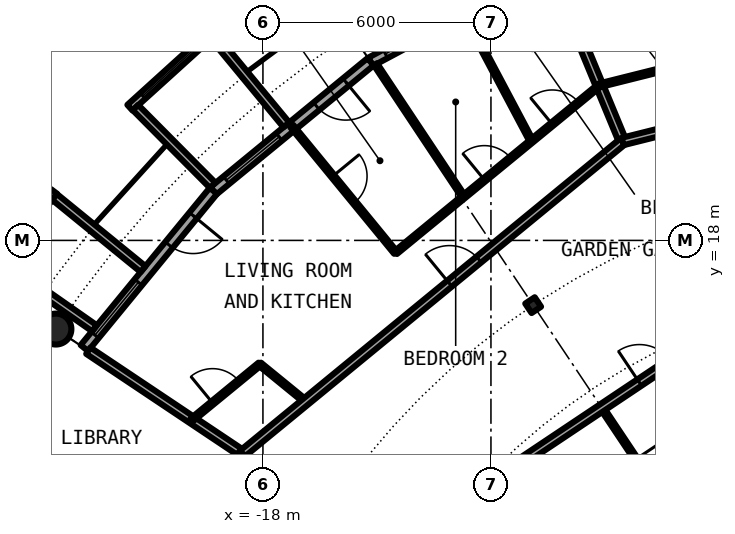
"""IFC4 building model, lengths in metres.
Left out: names, types, materials, properties, quantities, classifications, styles, units other than length and angle.
Written with IfcOpenShell. Run it as: python <this file> out.ifc"""

import sys

from ifc_helpers import new_model, si_unit, direction, frame, frame_2d, origin, origin_2d, place, context, subcontext, project, spatial, rectangle, circle, hollow_circle, i_section, extrude, element, fill, save


model = new_model("IFC4")
c1 = context("Model", 3, precision=1e-05, world=origin(), true_north=direction((0.0, 1.0)))
c2 = subcontext(c1, "Body", "Model", "MODEL_VIEW")
j1 = project(units=[si_unit("LENGTHUNIT", "METRE"), si_unit("PLANEANGLEUNIT", "RADIAN")], contexts=[c1])
p1 = place(None, origin())
s1 = spatial("IfcSite", under=j1, at=p1, CompositionType="ELEMENT")
p2 = place(p1, origin())
s2 = spatial("IfcBuilding", under=s1, at=p2, CompositionType="ELEMENT")
p3 = place(p2, frame((0.0, 0.0, 227.95)))
s3 = spatial("IfcBuildingStorey", under=s2, at=p3, CompositionType="ELEMENT", Elevation=227.95)
p4 = place(p3, frame((-23.448, 15.667, 0.0), z_axis=(0.0, 0.0, 1.0), x_axis=(1.0, 0.0, 0.0)))
e1 = element("IfcColumn", 1, at=p4, inside=s3, PredefinedType="COLUMN", context=c2, shape_type="SweptSolid", body=[
    extrude(hollow_circle(Radius=0.406, WallThickness=0.03, at=origin_2d()), origin(), (0.0, 0.0, 1.0), 3.05),
])
p5 = place(p3, frame((-10.889, 16.297, 0.0), z_axis=(0.0, 0.0, 1.0), x_axis=(-0.55557023302, 0.831469612303, 0.0)))
e2 = element("IfcColumn", 2, at=p5, inside=s3, PredefinedType="COLUMN", context=c2, shape_type="SweptSolid", body=[
    extrude(i_section(OverallWidth=0.3, OverallDepth=0.3, WebThickness=0.011, FlangeThickness=0.019, FilletRadius=0.027, at=origin_2d()), origin(), (0.0, 0.0, 1.0), 3.05),
])
p6 = place(p3, frame((-10.447, 25.222, 0.0), z_axis=(0.0, 0.0, 1.0), x_axis=(-0.881915646801, -0.471407246368, 0.0)))
e3 = element("IfcWall", 3, at=p6, inside=s3, PredefinedType="SOLIDWALL", context=c2, shape_type="SweptSolid", body=[
    extrude(rectangle(XDim=5.352, YDim=0.25, at=frame_2d((2.676, 0.0))), origin(), (0.0, 0.0, 1.0), 2.7),
])
p7 = place(p6, frame((0.841, 0.0, 0.0)))
e4 = element("IfcOpeningElement", 4, at=p7, cuts=e3, PredefinedType="OPENING", context=c2, shape_type="SweptSolid", body=[
    extrude(rectangle(XDim=1.0, YDim=2.2, at=frame_2d((0.5, 1.1))), frame((0.0, 0.135, 0.0), z_axis=(0.0, -1.0, 0.0), x_axis=(1.0, 0.0, 0.0)), (0.0, 0.0, 1.0), 0.27),
])
p8 = place(p6, frame((3.111, 0.0, 0.3)))
e5 = element("IfcOpeningElement", 5, at=p8, cuts=e3, PredefinedType="OPENING", context=c2, shape_type="SweptSolid", body=[
    extrude(rectangle(XDim=1.8, YDim=2.1, at=frame_2d((0.9, 1.05))), frame((0.0, 0.135, 0.0), z_axis=(0.0, -1.0, 0.0), x_axis=(1.0, 0.0, 0.0)), (0.0, 0.0, 1.0), 0.27),
])
p9 = place(p3, frame((-15.167, 22.699, 0.0), z_axis=(0.0, 0.0, 1.0), x_axis=(-0.773019449054, -0.634382322723, 0.0)))
e6 = element("IfcWall", 6, at=p9, inside=s3, PredefinedType="SOLIDWALL", context=c2, shape_type="SweptSolid", body=[
    extrude(rectangle(XDim=5.352, YDim=0.25, at=frame_2d((2.676, 0.0))), origin(), (0.0, 0.0, 1.0), 2.7),
])
p10 = place(p9, frame((0.841, 0.0, 0.0)))
e7 = element("IfcOpeningElement", 7, at=p10, cuts=e6, PredefinedType="OPENING", context=c2, shape_type="SweptSolid", body=[
    extrude(rectangle(XDim=1.0, YDim=2.2, at=frame_2d((0.5, 1.1))), frame((0.0, 0.135, 0.0), z_axis=(0.0, -1.0, 0.0), x_axis=(1.0, 0.0, 0.0)), (0.0, 0.0, 1.0), 0.27),
])
p11 = place(p9, frame((3.111, 0.0, 0.3)))
e8 = element("IfcOpeningElement", 8, at=p11, cuts=e6, PredefinedType="OPENING", context=c2, shape_type="SweptSolid", body=[
    extrude(rectangle(XDim=1.8, YDim=2.1, at=frame_2d((0.9, 1.05))), frame((0.0, 0.135, 0.0), z_axis=(0.0, -1.0, 0.0), x_axis=(1.0, 0.0, 0.0)), (0.0, 0.0, 1.0), 0.27),
])
p12 = place(p3, frame((-19.282, 23.503, -0.03), z_axis=(0.0, 0.0, 1.0), x_axis=(-0.740998365753, -0.671506829416, 0.0)))
e9 = element("IfcWall", 9, at=p12, inside=s3, PredefinedType="SOLIDWALL", context=c2, shape_type="SweptSolid", body=[
    extrude(rectangle(XDim=2.993, YDim=0.2, at=frame_2d((1.497, 0.0))), origin(), (0.0, 0.0, 1.0), 2.73),
])
p13 = place(p12, frame((0.457, 0.0, 0.33)))
e10 = element("IfcOpeningElement", 10, at=p13, cuts=e9, PredefinedType="OPENING", context=c2, shape_type="SweptSolid", body=[
    extrude(circle(Radius=1.04, at=frame_2d((1.04, 1.04))), frame((0.0, 0.11, 0.0), z_axis=(0.0, -1.0, 0.0), x_axis=(1.0, 0.0, 0.0)), (0.0, 0.0, 1.0), 0.22),
])
p14 = place(p3, frame((-17.384, 21.041, -0.03), z_axis=(0.0, 0.0, 1.0), x_axis=(-0.63709551667, 0.770784861449, 0.0)))
e11 = element("IfcWall", 11, at=p14, inside=s3, PredefinedType="SOLIDWALL", context=c2, shape_type="SweptSolid", body=[
    extrude(rectangle(XDim=3.006, YDim=0.2, at=frame_2d((1.503, 0.0))), origin(), (0.0, 0.0, 1.0), 2.73),
])
p15 = place(p3, frame((-19.323, 19.45, -0.03), z_axis=(0.0, 0.0, 1.0), x_axis=(-0.704476739375, 0.709727076896, 0.0)))
e12 = element("IfcWall", 12, at=p15, inside=s3, PredefinedType="SOLIDWALL", context=c2, shape_type="SweptSolid", body=[
    extrude(rectangle(XDim=2.883, YDim=0.2, at=frame_2d((1.441, 0.0))), origin(), (0.0, 0.0, 1.0), 2.73),
])
p16 = place(p3, frame((-19.304, 19.304, 0.0), z_axis=(0.0, 0.0, 1.0), x_axis=(-0.634382322723, -0.773019449054, 0.0)))
e13 = element("IfcWall", 13, at=p16, inside=s3, PredefinedType="SOLIDWALL", context=c2, shape_type="SweptSolid", body=[
    extrude(rectangle(XDim=5.352, YDim=0.25, at=frame_2d((2.676, 0.0))), origin(), (0.0, 0.0, 1.0), 2.7),
])
p17 = place(p16, frame((0.841, 0.0, 0.0)))
e14 = element("IfcOpeningElement", 14, at=p17, cuts=e13, PredefinedType="OPENING", context=c2, shape_type="SweptSolid", body=[
    extrude(rectangle(XDim=1.0, YDim=2.2, at=frame_2d((0.5, 1.1))), frame((0.0, 0.135, 0.0), z_axis=(0.0, -1.0, 0.0), x_axis=(1.0, 0.0, 0.0)), (0.0, 0.0, 1.0), 0.27),
])
p18 = place(p16, frame((3.111, 0.0, 0.3)))
e15 = element("IfcOpeningElement", 15, at=p18, cuts=e13, PredefinedType="OPENING", context=c2, shape_type="SweptSolid", body=[
    extrude(rectangle(XDim=1.8, YDim=2.1, at=frame_2d((0.9, 1.05))), frame((0.0, 0.135, 0.0), z_axis=(0.0, -1.0, 0.0), x_axis=(1.0, 0.0, 0.0)), (0.0, 0.0, 1.0), 0.27),
])
p19 = place(p3, frame((-23.497, 19.289, -0.03), z_axis=(0.0, 0.0, 1.0), x_axis=(-0.602806268067, -0.797887588059, 0.0)))
e16 = element("IfcWall", 16, at=p19, inside=s3, PredefinedType="SOLIDWALL", context=c2, shape_type="SweptSolid", body=[
    extrude(rectangle(XDim=2.447, YDim=0.2, at=frame_2d((1.223, 0.0))), origin(), (0.0, 0.0, 1.0), 2.73),
])
p20 = place(p19, frame((0.183, 0.0, 0.33)))
e17 = element("IfcOpeningElement", 17, at=p20, cuts=e16, PredefinedType="OPENING", context=c2, shape_type="SweptSolid", body=[
    extrude(circle(Radius=1.04, at=frame_2d((1.04, 1.04))), frame((0.0, 0.11, 0.0), z_axis=(0.0, -1.0, 0.0), x_axis=(1.0, 0.0, 0.0)), (0.0, 0.0, 1.0), 0.22),
])
p21 = place(p3, frame((-21.155, 17.246, -0.03), z_axis=(0.0, 0.0, 1.0), x_axis=(-0.775179004516, 0.631741648902, 0.0)))
e18 = element("IfcWall", 18, at=p21, inside=s3, PredefinedType="SOLIDWALL", context=c2, shape_type="SweptSolid", body=[
    extrude(rectangle(XDim=3.006, YDim=0.2, at=frame_2d((1.503, 0.0))), origin(), (0.0, 0.0, 1.0), 2.73),
])
p22 = place(p3, frame((-22.433, 15.688, -0.03), z_axis=(0.0, 0.0, 1.0), x_axis=(-0.819373043115, 0.573260687834, 0.0)))
e19 = element("IfcWall", 19, at=p22, inside=s3, PredefinedType="SOLIDWALL", context=c2, shape_type="SweptSolid", body=[
    extrude(rectangle(XDim=2.925, YDim=0.2, at=frame_2d((1.463, 0.0))), origin(), (0.0, 0.0, 1.0), 2.73),
])
p23 = place(p3, frame((-22.595, 15.098, 0.0), z_axis=(0.0, 0.0, 1.0), x_axis=(0.831387096605, -0.55569370664, 0.0)))
e20 = element("IfcWall", 20, at=p23, inside=s3, PredefinedType="PARTITIONING", context=c2, shape_type="SweptSolid", body=[
    extrude(rectangle(XDim=4.875, YDim=0.2, at=frame_2d((2.438, 0.0))), origin(), (0.0, 0.0, 1.0), 2.7),
])
p24 = place(p3, frame((-18.084, 14.745, 0.0), z_axis=(0.0, 0.0, 1.0), x_axis=(0.774869051393, -0.632121786679, 0.0)))
e21 = element("IfcWall", 21, at=p24, inside=s3, PredefinedType="PARTITIONING", context=c2, shape_type="SweptSolid", body=[
    extrude(rectangle(XDim=1.562, YDim=0.1, at=frame_2d((0.781, 0.0))), origin(), (0.0, 0.0, 1.0), 2.7),
])
p25 = place(p3, frame((-17.24, 21.007, 0.0), z_axis=(0.0, 0.0, 1.0), x_axis=(0.634342681687, -0.77305197897, 0.0)))
e22 = element("IfcWall", 22, at=p25, inside=s3, PredefinedType="PARTITIONING", context=c2, shape_type="SweptSolid", body=[
    extrude(rectangle(XDim=4.305, YDim=0.1, at=frame_2d((2.153, 0.0))), origin(), (0.0, 0.0, 1.0), 2.7),
])
p26 = place(p25, frame((1.703, 0.0, 0.0)))
e23 = element("IfcOpeningElement", 23, at=p26, cuts=e22, PredefinedType="OPENING", context=c2, shape_type="SweptSolid", body=[
    extrude(rectangle(XDim=0.9, YDim=2.3, at=frame_2d((0.45, 1.15))), frame((0.0, 0.06, 0.0), z_axis=(0.0, -1.0, 0.0), x_axis=(1.0, 0.0, 0.0)), (0.0, 0.0, 1.0), 0.12),
])
p27 = place(p3, frame((-12.734, 24.007, 0.0), z_axis=(0.0, 0.0, 1.0), x_axis=(0.468594334564, -0.883413464701, 0.0)))
e24 = element("IfcWall", 24, at=p27, inside=s3, PredefinedType="PARTITIONING", context=c2, shape_type="SweptSolid", body=[
    extrude(rectangle(XDim=3.841, YDim=0.1, at=frame_2d((1.92, 0.0))), origin(), (0.0, 0.0, 1.0), 2.7),
])
p28 = place(p3, frame((-10.399, 25.106, 0.0), z_axis=(0.0, 0.0, 1.0), x_axis=(0.382651153718, -0.923892902104, 0.0)))
e25 = element("IfcWall", 25, at=p28, inside=s3, PredefinedType="PARTITIONING", context=c2, shape_type="SweptSolid", body=[
    extrude(rectangle(XDim=4.874, YDim=0.2, at=frame_2d((2.437, 0.0))), origin(), (0.0, 0.0, 1.0), 2.7),
])
p29 = place(p3, frame((-9.085, 13.597, 0.0), z_axis=(0.0, 0.0, 1.0), x_axis=(0.555528237031, -0.831497671591, 0.0)))
e26 = element("IfcWall", 26, at=p29, inside=s3, PredefinedType="PARTITIONING", context=c2, shape_type="SweptSolid", body=[
    extrude(rectangle(XDim=4.149, YDim=0.1, at=frame_2d((2.075, 0.0))), origin(), (0.0, 0.0, 1.0), 2.7),
])
p30 = place(p29, frame((1.625, 0.0, 0.0)))
e27 = element("IfcOpeningElement", 27, at=p30, cuts=e26, PredefinedType="OPENING", context=c2, shape_type="SweptSolid", body=[
    extrude(rectangle(XDim=0.9, YDim=2.3, at=frame_2d((0.45, 1.15))), frame((0.0, 0.06, 0.0), z_axis=(0.0, -1.0, 0.0), x_axis=(1.0, 0.0, 0.0)), (0.0, 0.0, 1.0), 0.12),
])
p31 = place(p3, frame((-7.897, 26.002, 0.0), z_axis=(0.0, 0.0, 1.0), x_axis=(0.290784578865, -0.956788549625, 0.0)))
e28 = element("IfcWall", 28, at=p31, inside=s3, PredefinedType="PARTITIONING", context=c2, shape_type="SweptSolid", body=[
    extrude(rectangle(XDim=3.504, YDim=0.1, at=frame_2d((1.752, 0.0))), origin(), (0.0, 0.0, 1.0), 2.7),
])
p32 = place(p31, frame((1.302, 0.0, 0.0)))
e29 = element("IfcOpeningElement", 29, at=p32, cuts=e28, PredefinedType="OPENING", context=c2, shape_type="SweptSolid", body=[
    extrude(rectangle(XDim=0.9, YDim=2.3, at=frame_2d((0.45, 1.15))), frame((0.0, 0.06, 0.0), z_axis=(0.0, -1.0, 0.0), x_axis=(1.0, 0.0, 0.0)), (0.0, 0.0, 1.0), 0.12),
])
p33 = place(p3, frame((-15.039, 22.634, 0.0), z_axis=(0.0, 0.0, 1.0), x_axis=(0.553609857728, -0.832776155654, 0.0)))
e30 = element("IfcWall", 30, at=p33, inside=s3, PredefinedType="PARTITIONING", context=c2, shape_type="SweptSolid", body=[
    extrude(rectangle(XDim=4.187, YDim=0.1, at=frame_2d((2.094, 0.0))), origin(), (0.0, 0.0, 1.0), 2.7),
])
p34 = place(p3, frame((-14.718, 9.832, 0.0), z_axis=(0.0, 0.0, 1.0), x_axis=(0.831437137577, 0.555618831806, 0.0)))
e31 = element("IfcWall", 31, at=p34, inside=s3, PredefinedType="PARTITIONING", context=c2, shape_type="SweptSolid", body=[
    extrude(rectangle(XDim=13.549, YDim=0.2, at=frame_2d((6.774, 0.0))), origin(), (0.0, 0.0, 1.0), 2.7),
])
p35 = place(p34, frame((7.968, 0.0, 0.0)))
e32 = element("IfcOpeningElement", 32, at=p35, cuts=e31, PredefinedType="OPENING", context=c2, shape_type="SweptSolid", body=[
    extrude(rectangle(XDim=1.0, YDim=2.3, at=frame_2d((0.5, 1.15))), frame((0.0, 0.11, 0.0), z_axis=(0.0, -1.0, 0.0), x_axis=(1.0, 0.0, 0.0)), (0.0, 0.0, 1.0), 0.22),
])
p36 = place(p3, frame((-18.542, 12.389, 0.0), z_axis=(0.0, 0.0, 1.0), x_axis=(0.772983503654, 0.634426121056, 0.0)))
e33 = element("IfcWall", 33, at=p36, inside=s3, PredefinedType="PARTITIONING", context=c2, shape_type="SweptSolid", body=[
    extrude(rectangle(XDim=12.947, YDim=0.2, at=frame_2d((6.474, 0.0))), origin(), (0.0, 0.0, 1.0), 2.7),
])
p37 = place(p36, frame((7.053, 0.0, 0.0)))
e34 = element("IfcOpeningElement", 34, at=p37, cuts=e33, PredefinedType="OPENING", context=c2, shape_type="SweptSolid", body=[
    extrude(rectangle(XDim=1.0, YDim=2.3, at=frame_2d((0.5, 1.15))), frame((0.0, 0.11, 0.0), z_axis=(0.0, -1.0, 0.0), x_axis=(1.0, 0.0, 0.0)), (0.0, 0.0, 1.0), 0.22),
])
p38 = place(p3, frame((-8.534, 20.603, 0.0), z_axis=(0.0, 0.0, 1.0), x_axis=(0.97003047456, 0.242983288366, 0.0)))
e35 = element("IfcWall", 35, at=p38, inside=s3, PredefinedType="PARTITIONING", context=c2, shape_type="SweptSolid", body=[
    extrude(rectangle(XDim=6.544, YDim=0.2, at=frame_2d((3.272, 0.0))), origin(), (0.0, 0.0, 1.0), 2.7),
])
p39 = place(p38, frame((1.681, 0.0, 0.0)))
e36 = element("IfcOpeningElement", 36, at=p39, cuts=e35, PredefinedType="OPENING", context=c2, shape_type="SweptSolid", body=[
    extrude(rectangle(XDim=1.0, YDim=2.3, at=frame_2d((0.5, 1.15))), frame((0.0, 0.11, 0.0), z_axis=(0.0, -1.0, 0.0), x_axis=(1.0, 0.0, 0.0)), (0.0, 0.0, 1.0), 0.22),
])
p40 = place(p3, frame((-19.328, 10.896, 0.0), z_axis=(0.0, 0.0, 1.0), x_axis=(0.465812036273, 0.88488369115, 0.0)))
e37 = element("IfcWall", 37, at=p40, inside=s3, PredefinedType="PARTITIONING", context=c2, shape_type="SweptSolid", body=[
    extrude(rectangle(XDim=1.687, YDim=0.2, at=frame_2d((0.844, 0.0))), origin(), (0.0, 0.0, 1.0), 2.7),
])
p41 = place(p3, frame((-19.872, 13.278, 0.0), z_axis=(0.0, 0.0, 1.0), x_axis=(0.773095932958, 0.634289112663, 0.0)))
e38 = element("IfcWall", 38, at=p41, inside=s3, PredefinedType="PARTITIONING", context=c2, shape_type="SweptSolid", body=[
    extrude(rectangle(XDim=2.313, YDim=0.1, at=frame_2d((1.156, 0.0))), origin(), (0.0, 0.0, 1.0), 2.7),
])
p42 = place(p41, frame((0.706, 0.0, 0.0)))
e39 = element("IfcOpeningElement", 39, at=p42, cuts=e38, PredefinedType="OPENING", context=c2, shape_type="SweptSolid", body=[
    extrude(rectangle(XDim=0.9, YDim=2.3, at=frame_2d((0.45, 1.15))), frame((0.0, 0.06, 0.0), z_axis=(0.0, -1.0, 0.0), x_axis=(1.0, 0.0, 0.0)), (0.0, 0.0, 1.0), 0.12),
])
p43 = place(p3, frame((-14.505, 17.681, 0.0), z_axis=(0.0, 0.0, 1.0), x_axis=(0.773067618794, 0.634323621484, 0.0)))
e40 = element("IfcWall", 40, at=p43, inside=s3, PredefinedType="PARTITIONING", context=c2, shape_type="SweptSolid", body=[
    extrude(rectangle(XDim=6.938, YDim=0.1, at=frame_2d((3.469, 0.0))), origin(), (0.0, 0.0, 1.0), 2.7),
])
p44 = place(p43, frame((3.016, 0.0, 0.0)))
e41 = element("IfcOpeningElement", 41, at=p44, cuts=e40, PredefinedType="OPENING", context=c2, shape_type="SweptSolid", body=[
    extrude(rectangle(XDim=0.9, YDim=2.3, at=frame_2d((0.45, 1.15))), frame((0.0, 0.06, 0.0), z_axis=(0.0, -1.0, 0.0), x_axis=(1.0, 0.0, 0.0)), (0.0, 0.0, 1.0), 0.12),
])
p45 = place(p43, frame((5.325, 0.0, 0.0)))
e42 = element("IfcOpeningElement", 42, at=p45, cuts=e40, PredefinedType="OPENING", context=c2, shape_type="SweptSolid", body=[
    extrude(rectangle(XDim=0.9, YDim=2.3, at=frame_2d((0.45, 1.15))), frame((0.0, 0.06, 0.0), z_axis=(0.0, -1.0, 0.0), x_axis=(1.0, 0.0, 0.0)), (0.0, 0.0, 1.0), 0.12),
])
p46 = place(p3, frame((-9.148, 22.08, 0.0), z_axis=(0.0, 0.0, 1.0), x_axis=(0.9700564467, 0.242879579658, 0.0)))
e43 = element("IfcWall", 43, at=p46, inside=s3, PredefinedType="PARTITIONING", context=c2, shape_type="SweptSolid", body=[
    extrude(rectangle(XDim=2.338, YDim=0.1, at=frame_2d((1.169, 0.0))), origin(), (0.0, 0.0, 1.0), 2.7),
])
p47 = place(p8, origin())
e44 = element("IfcWindow", 44, at=p47, inside=s3, PartitioningType="SINGLE_PANEL", PredefinedType="WINDOW", context=c2, shape_type="SweptSolid", body=[
    extrude(rectangle(XDim=1.8, YDim=2.1, at=frame_2d((0.9, 1.05))), frame((0.0, 0.03, 0.0), z_axis=(0.0, -1.0, 0.0), x_axis=(1.0, 0.0, 0.0)), (0.0, 0.0, 1.0), 0.06),
])
fill(e5, e44)
p48 = place(p10, origin())
e45 = element("IfcDoor", 45, at=p48, inside=s3, OperationType="SINGLE_SWING_LEFT", PredefinedType="DOOR", context=c2, shape_type="SweptSolid", body=[
    extrude(rectangle(XDim=1.0, YDim=2.2, at=frame_2d((0.5, 1.1))), frame((0.0, 0.025, 0.0), z_axis=(0.0, -1.0, 0.0), x_axis=(1.0, 0.0, 0.0)), (0.0, 0.0, 1.0), 0.05),
])
fill(e7, e45)
p49 = place(p11, origin())
e46 = element("IfcWindow", 46, at=p49, inside=s3, PartitioningType="SINGLE_PANEL", PredefinedType="WINDOW", context=c2, shape_type="SweptSolid", body=[
    extrude(rectangle(XDim=1.8, YDim=2.1, at=frame_2d((0.9, 1.05))), frame((0.0, 0.03, 0.0), z_axis=(0.0, -1.0, 0.0), x_axis=(1.0, 0.0, 0.0)), (0.0, 0.0, 1.0), 0.06),
])
fill(e8, e46)
p50 = place(p13, origin())
e47 = element("IfcWindow", 47, at=p50, inside=s3, PartitioningType="SINGLE_PANEL", PredefinedType="WINDOW", context=c2, shape_type="SweptSolid", body=[
    extrude(circle(Radius=1.04, at=frame_2d((1.04, 1.04))), frame((0.0, 0.03, 0.0), z_axis=(0.0, -1.0, 0.0), x_axis=(1.0, 0.0, 0.0)), (0.0, 0.0, 1.0), 0.06),
])
fill(e10, e47)
p51 = place(p17, origin())
e48 = element("IfcDoor", 48, at=p51, inside=s3, OperationType="SINGLE_SWING_LEFT", PredefinedType="DOOR", context=c2, shape_type="SweptSolid", body=[
    extrude(rectangle(XDim=1.0, YDim=2.2, at=frame_2d((0.5, 1.1))), frame((0.0, 0.025, 0.0), z_axis=(0.0, -1.0, 0.0), x_axis=(1.0, 0.0, 0.0)), (0.0, 0.0, 1.0), 0.05),
])
fill(e14, e48)
p52 = place(p18, origin())
e49 = element("IfcWindow", 49, at=p52, inside=s3, PartitioningType="SINGLE_PANEL", PredefinedType="WINDOW", context=c2, shape_type="SweptSolid", body=[
    extrude(rectangle(XDim=1.8, YDim=2.1, at=frame_2d((0.9, 1.05))), frame((0.0, 0.03, 0.0), z_axis=(0.0, -1.0, 0.0), x_axis=(1.0, 0.0, 0.0)), (0.0, 0.0, 1.0), 0.06),
])
fill(e15, e49)
p53 = place(p37, origin())
e50 = element("IfcDoor", 50, at=p53, inside=s3, OperationType="SINGLE_SWING_RIGHT", PredefinedType="DOOR", context=c2, shape_type="SweptSolid", body=[
    extrude(rectangle(XDim=1.0, YDim=2.3, at=frame_2d((0.5, 1.15))), frame((0.0, 0.025, 0.0), z_axis=(0.0, -1.0, 0.0), x_axis=(1.0, 0.0, 0.0)), (0.0, 0.0, 1.0), 0.05),
])
fill(e34, e50)
p54 = place(p42, origin())
e51 = element("IfcDoor", 51, at=p54, inside=s3, OperationType="SINGLE_SWING_LEFT", PredefinedType="DOOR", context=c2, shape_type="SweptSolid", body=[
    extrude(rectangle(XDim=0.9, YDim=2.3, at=frame_2d((0.45, 1.15))), frame((0.0, 0.025, 0.0), z_axis=(0.0, -1.0, 0.0), x_axis=(1.0, 0.0, 0.0)), (0.0, 0.0, 1.0), 0.05),
])
fill(e39, e51)
p55 = place(p26, origin())
e52 = element("IfcDoor", 52, at=p55, inside=s3, OperationType="SINGLE_SWING_LEFT", PredefinedType="DOOR", context=c2, shape_type="SweptSolid", body=[
    extrude(rectangle(XDim=0.9, YDim=2.3, at=frame_2d((0.45, 1.15))), frame((0.0, 0.025, 0.0), z_axis=(0.0, -1.0, 0.0), x_axis=(1.0, 0.0, 0.0)), (0.0, 0.0, 1.0), 0.05),
])
fill(e23, e52)
p56 = place(p44, origin())
e53 = element("IfcDoor", 53, at=p56, inside=s3, OperationType="SINGLE_SWING_LEFT", PredefinedType="DOOR", context=c2, shape_type="SweptSolid", body=[
    extrude(rectangle(XDim=0.9, YDim=2.3, at=frame_2d((0.45, 1.15))), frame((0.0, 0.025, 0.0), z_axis=(0.0, -1.0, 0.0), x_axis=(1.0, 0.0, 0.0)), (0.0, 0.0, 1.0), 0.05),
])
fill(e41, e53)
p57 = place(p45, origin())
e54 = element("IfcDoor", 54, at=p57, inside=s3, OperationType="SINGLE_SWING_RIGHT", PredefinedType="DOOR", context=c2, shape_type="SweptSolid", body=[
    extrude(rectangle(XDim=0.9, YDim=2.3, at=frame_2d((0.45, 1.15))), frame((0.0, 0.025, 0.0), z_axis=(0.0, -1.0, 0.0), x_axis=(1.0, 0.0, 0.0)), (0.0, 0.0, 1.0), 0.05),
])
fill(e42, e54)
p58 = place(p35, origin())
e55 = element("IfcDoor", 55, at=p58, inside=s3, OperationType="SINGLE_SWING_RIGHT", PredefinedType="DOOR", context=c2, shape_type="SweptSolid", body=[
    extrude(rectangle(XDim=1.0, YDim=2.3, at=frame_2d((0.5, 1.15))), frame((0.0, 0.025, 0.0), z_axis=(0.0, -1.0, 0.0), x_axis=(1.0, 0.0, 0.0)), (0.0, 0.0, 1.0), 0.05),
])
fill(e32, e55)
save(model, sys.argv[1])
